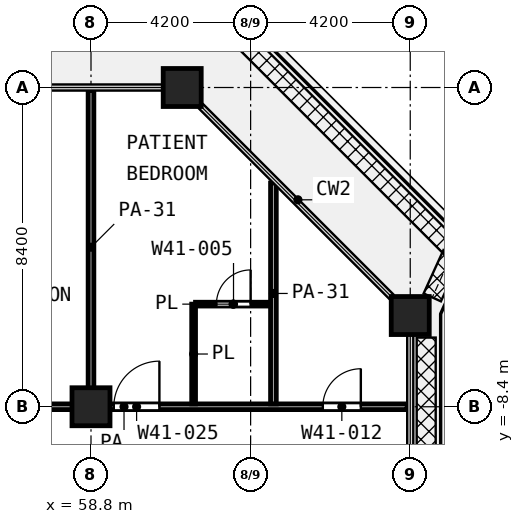
"""IFC4 building model, lengths in metres.
Left out: names, types, materials, properties, quantities, classifications, styles, units other than length and angle.
Written with IfcOpenShell. Run it as: python <this file> out.ifc"""

import sys

from ifc_helpers import new_model, si_unit, direction, frame, frame_2d, origin, origin_2d, place, context, subcontext, project, spatial, rectangle, extrude, element, fill, save


model = new_model("IFC4")
c1 = context("Model", 3, precision=1e-05, world=origin(), true_north=direction((0.0, 1.0)))
c2 = subcontext(c1, "Body", "Model", "MODEL_VIEW")
j1 = project(units=[si_unit("LENGTHUNIT", "METRE"), si_unit("PLANEANGLEUNIT", "RADIAN")], contexts=[c1])
p1 = place(None, origin())
s1 = spatial("IfcSite", under=j1, at=p1, CompositionType="ELEMENT")
p2 = place(p1, origin())
s2 = spatial("IfcBuilding", under=s1, at=p2, CompositionType="ELEMENT")
p3 = place(p2, frame((0.0, 0.0, 179.4)))
s3 = spatial("IfcBuildingStorey", under=s2, at=p3, CompositionType="ELEMENT", Elevation=179.4)
for number, where, z_axis, x_axis in (
    (1, (61.2, 0.0, 0.0), (0.0, 0.0, 1.0), (1.0, 0.0, 0.0)),
    (2, (67.2, -6.0, 0.0), (0.0, 0.0, 1.0), (1.0, 0.0, 0.0)),
    (3, (58.8, -8.4, 0.0), (0.0, 0.0, 1.0), (1.0, 0.0, 0.0)),
):
    element("IfcColumn", number, at=place(p3, frame(where, z_axis=z_axis, x_axis=x_axis)), inside=s3, PredefinedType="COLUMN", context=c2, shape_type="SweptSolid", body=[
        extrude(rectangle(XDim=1.0, YDim=1.0, at=origin_2d()), origin(), (0.0, 0.0, 1.0), 4.2),
    ])
p4 = place(p3, frame((61.55, -5.7, 0.0), z_axis=(0.0, 0.0, 1.0), x_axis=(1.0, 0.0, 0.0)))
e4 = element("IfcWall", 4, at=p4, inside=s3, PredefinedType="PARTITIONING", context=c2, shape_type="SweptSolid", body=[
    extrude(rectangle(XDim=1.975, YDim=0.1, at=frame_2d((0.987, 0.0))), origin(), (0.0, 0.0, 1.0), 3.6),
])
p5 = place(p4, frame((0.55, 0.0, 0.0)))
e5 = element("IfcOpeningElement", 5, at=p5, cuts=e4, PredefinedType="OPENING", context=c2, shape_type="SweptSolid", body=[
    extrude(rectangle(XDim=0.9, YDim=2.1, at=frame_2d((0.45, 1.05))), frame((0.0, 0.06, 0.0), z_axis=(0.0, -1.0, 0.0), x_axis=(1.0, 0.0, 0.0)), (0.0, 0.0, 1.0), 0.12),
])
p6 = place(p3, frame((61.5, -8.325, 0.0), z_axis=(0.0, 0.0, 1.0), x_axis=(0.0, 1.0, 0.0)))
e6 = element("IfcWall", 6, at=p6, inside=s3, PredefinedType="PARTITIONING", context=c2, shape_type="SweptSolid", body=[
    extrude(rectangle(XDim=2.625, YDim=0.1, at=frame_2d((1.312, 0.0))), origin(), (0.0, 0.0, 1.0), 3.6),
])
p7 = place(p3, frame((52.218, -8.4, 0.0), z_axis=(0.0, 0.0, 1.0), x_axis=(1.0, 0.0, 0.0)))
e7 = element("IfcWall", 7, at=p7, inside=s3, PredefinedType="PARTITIONING", context=c2, shape_type="SweptSolid", body=[
    extrude(rectangle(XDim=14.902, YDim=0.15, at=frame_2d((7.451, 0.0))), origin(), (0.0, 0.0, 1.0), 3.6),
])
p8 = place(p7, frame((3.982, 0.0, 0.0)))
e8 = element("IfcOpeningElement", 8, at=p8, cuts=e7, PredefinedType="OPENING", context=c2, shape_type="SweptSolid", body=[
    extrude(rectangle(XDim=1.0, YDim=2.1, at=frame_2d((0.5, 1.05))), frame((0.0, 0.085, 0.0), z_axis=(0.0, -1.0, 0.0), x_axis=(1.0, 0.0, 0.0)), (0.0, 0.0, 1.0), 0.17),
])
p9 = place(p7, frame((7.182, 0.0, 0.0)))
e9 = element("IfcOpeningElement", 9, at=p9, cuts=e7, PredefinedType="OPENING", context=c2, shape_type="SweptSolid", body=[
    extrude(rectangle(XDim=1.2, YDim=2.1, at=frame_2d((0.6, 1.05))), frame((0.0, 0.085, 0.0), z_axis=(0.0, -1.0, 0.0), x_axis=(1.0, 0.0, 0.0)), (0.0, 0.0, 1.0), 0.17),
])
p10 = place(p7, frame((12.682, 0.0, 0.0)))
e10 = element("IfcOpeningElement", 10, at=p10, cuts=e7, PredefinedType="OPENING", context=c2, shape_type="SweptSolid", body=[
    extrude(rectangle(XDim=1.0, YDim=2.1, at=frame_2d((0.5, 1.05))), frame((0.0, 0.085, 0.0), z_axis=(0.0, -1.0, 0.0), x_axis=(1.0, 0.0, 0.0)), (0.0, 0.0, 1.0), 0.17),
])
p11 = place(p3, frame((58.8, -8.325, 0.0), z_axis=(0.0, 0.0, 1.0), x_axis=(0.0, 1.0, 0.0)))
e11 = element("IfcWall", 11, at=p11, inside=s3, PredefinedType="PARTITIONING", context=c2, shape_type="SweptSolid", body=[
    extrude(rectangle(XDim=8.245, YDim=0.15, at=frame_2d((4.123, 0.0))), origin(), (0.0, 0.0, 1.0), 2.7),
])
p12 = place(p3, frame((63.6, -8.325, 0.0), z_axis=(0.0, 0.0, 1.0), x_axis=(0.0, 1.0, 0.0)))
e12 = element("IfcWall", 12, at=p12, inside=s3, PredefinedType="PARTITIONING", context=c2, shape_type="SweptSolid", body=[
    extrude(rectangle(XDim=5.812, YDim=0.15, at=frame_2d((2.906, 0.0))), origin(), (0.0, 0.0, 1.0), 2.7),
])
p13 = place(p9, origin())
e13 = element("IfcDoor", 13, at=p13, inside=s3, OperationType="SINGLE_SWING_RIGHT", PredefinedType="DOOR", context=c2, shape_type="SweptSolid", body=[
    extrude(rectangle(XDim=1.2, YDim=2.1, at=frame_2d((0.6, 1.05))), frame((0.0, 0.025, 0.0), z_axis=(0.0, -1.0, 0.0), x_axis=(1.0, 0.0, 0.0)), (0.0, 0.0, 1.0), 0.05),
])
fill(e9, e13)
p14 = place(p5, origin())
e14 = element("IfcDoor", 14, at=p14, inside=s3, OperationType="SINGLE_SWING_RIGHT", PredefinedType="DOOR", context=c2, shape_type="SweptSolid", body=[
    extrude(rectangle(XDim=0.9, YDim=2.1, at=frame_2d((0.45, 1.05))), frame((0.0, 0.025, 0.0), z_axis=(0.0, -1.0, 0.0), x_axis=(1.0, 0.0, 0.0)), (0.0, 0.0, 1.0), 0.05),
])
fill(e5, e14)
p15 = place(p10, origin())
e15 = element("IfcDoor", 15, at=p15, inside=s3, OperationType="SINGLE_SWING_RIGHT", PredefinedType="DOOR", context=c2, shape_type="SweptSolid", body=[
    extrude(rectangle(XDim=1.0, YDim=2.1, at=frame_2d((0.5, 1.05))), frame((0.0, 0.025, 0.0), z_axis=(0.0, -1.0, 0.0), x_axis=(1.0, 0.0, 0.0)), (0.0, 0.0, 1.0), 0.05),
])
fill(e10, e15)
save(model, sys.argv[1])
